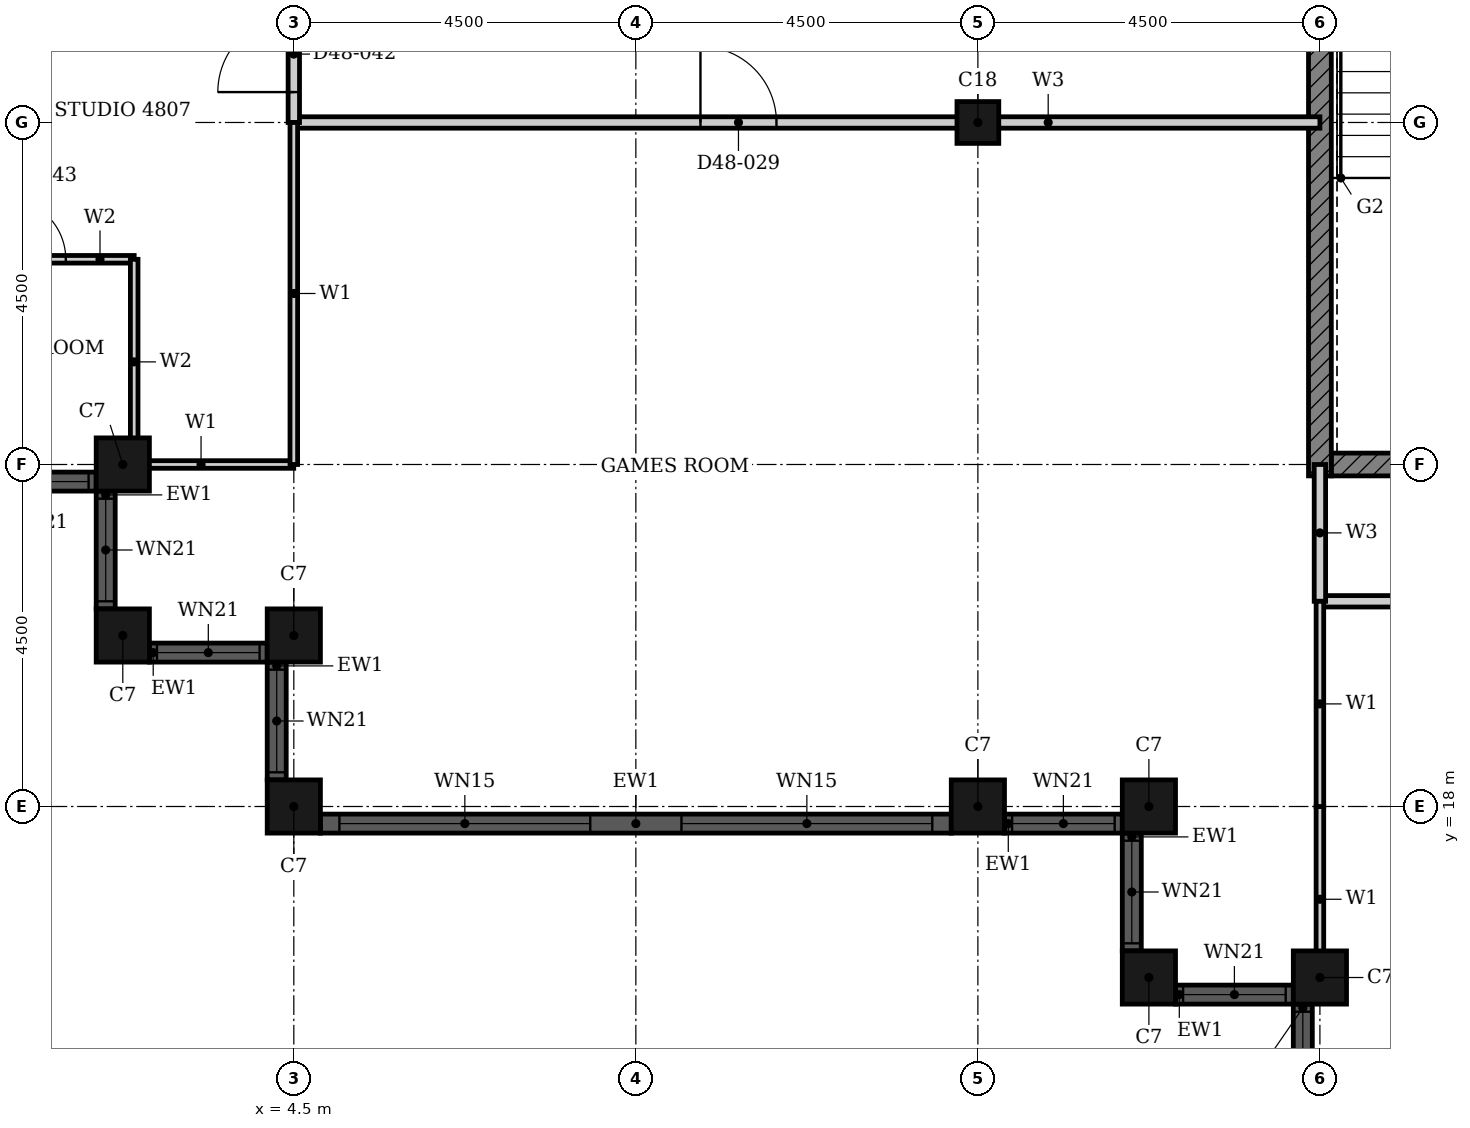
"""IFC4 building model, lengths in metres.
Left out: names, types, materials, properties, quantities, classifications, styles, units other than length and angle.
Written with IfcOpenShell. Run it as: python <this file> out.ifc"""

import sys

from ifc_helpers import new_model, si_unit, direction, frame, frame_2d, origin, origin_2d, place, context, subcontext, project, spatial, rectangle, hollow_rectangle, extrude, element, fill, save


model = new_model("IFC4")
c1 = context("Model", 3, precision=1e-05, world=origin(), true_north=direction((0.0, 1.0)))
c2 = subcontext(c1, "Body", "Model", "MODEL_VIEW")
j1 = project(units=[si_unit("LENGTHUNIT", "METRE"), si_unit("PLANEANGLEUNIT", "RADIAN")], contexts=[c1])
p1 = place(None, origin())
s1 = spatial("IfcSite", under=j1, at=p1, CompositionType="ELEMENT")
p2 = place(p1, origin())
s2 = spatial("IfcBuilding", under=s1, at=p2, CompositionType="ELEMENT")
p3 = place(p2, frame((0.0, 0.0, 192.4)))
s3 = spatial("IfcBuildingStorey", under=s2, at=p3, CompositionType="ELEMENT", Elevation=192.4)
for number, where, z_axis, x_axis in (
    (1, (2.25, 22.5, 0.0), (0.0, 0.0, 1.0), (1.0, 0.0, 0.0)),
    (2, (2.25, 20.25, 0.0), (0.0, 0.0, 1.0), (1.0, 0.0, 0.0)),
    (3, (4.5, 20.25, 0.0), (0.0, 0.0, 1.0), (1.0, 0.0, 0.0)),
    (4, (4.5, 18.0, 0.0), (0.0, 0.0, 1.0), (1.0, 0.0, 0.0)),
    (5, (13.5, 18.0, 0.0), (0.0, 0.0, 1.0), (1.0, 0.0, 0.0)),
    (6, (15.75, 18.0, 0.0), (0.0, 0.0, 1.0), (1.0, 0.0, 0.0)),
    (7, (15.75, 15.75, 0.0), (0.0, 0.0, 1.0), (1.0, 0.0, 0.0)),
    (8, (18.0, 15.75, 0.0), (0.0, 0.0, 1.0), (1.0, 0.0, 0.0)),
):
    element("IfcColumn", number, at=place(p3, frame(where, z_axis=z_axis, x_axis=x_axis)), inside=s3, PredefinedType="COLUMN", context=c2, shape_type="SweptSolid", body=[
        extrude(hollow_rectangle(XDim=0.7, YDim=0.7, WallThickness=0.022, at=origin_2d()), origin(), (0.0, 0.0, 1.0), 3.7),
    ])
p4 = place(p3, frame((13.5, 27.0, 0.0), z_axis=(0.0, 0.0, 1.0), x_axis=(1.0, 0.0, 0.0)))
e9 = element("IfcColumn", 9, at=p4, inside=s3, PredefinedType="COLUMN", context=c2, shape_type="SweptSolid", body=[
    extrude(hollow_rectangle(XDim=0.55, YDim=0.55, WallThickness=0.018, at=origin_2d()), origin(), (0.0, 0.0, 1.0), 3.7),
])
p5 = place(p3, frame((0.35, 22.275, 0.0), z_axis=(0.0, 0.0, 1.0), x_axis=(1.0, 0.0, 0.0)))
e10 = element("IfcWall", 10, at=p5, inside=s3, PredefinedType="SOLIDWALL", context=c2, shape_type="SweptSolid", body=[
    extrude(rectangle(XDim=1.55, YDim=0.25, at=frame_2d((0.775, 0.0))), origin(), (0.0, 0.0, 1.0), 3.7),
])
p6 = place(p5, frame((0.1, 0.0, 0.9)))
e11 = element("IfcOpeningElement", 11, at=p6, cuts=e10, PredefinedType="OPENING", context=c2, shape_type="SweptSolid", body=[
    extrude(rectangle(XDim=1.35, YDim=1.85, at=frame_2d((0.675, 0.925))), frame((0.0, 0.135, 0.0), z_axis=(0.0, -1.0, 0.0), x_axis=(1.0, 0.0, 0.0)), (0.0, 0.0, 1.0), 0.27),
])
p7 = place(p3, frame((2.025, 22.15, 0.0), z_axis=(0.0, 0.0, 1.0), x_axis=(0.0, -1.0, 0.0)))
e12 = element("IfcWall", 12, at=p7, inside=s3, PredefinedType="SOLIDWALL", context=c2, shape_type="SweptSolid", body=[
    extrude(rectangle(XDim=1.55, YDim=0.25, at=frame_2d((0.775, 0.0))), origin(), (0.0, 0.0, 1.0), 3.7),
])
p8 = place(p7, frame((0.1, 0.0, 0.9)))
e13 = element("IfcOpeningElement", 13, at=p8, cuts=e12, PredefinedType="OPENING", context=c2, shape_type="SweptSolid", body=[
    extrude(rectangle(XDim=1.35, YDim=1.85, at=frame_2d((0.675, 0.925))), frame((0.0, 0.135, 0.0), z_axis=(0.0, -1.0, 0.0), x_axis=(1.0, 0.0, 0.0)), (0.0, 0.0, 1.0), 0.27),
])
p9 = place(p3, frame((2.6, 20.025, 0.0), z_axis=(0.0, 0.0, 1.0), x_axis=(1.0, 0.0, 0.0)))
e14 = element("IfcWall", 14, at=p9, inside=s3, PredefinedType="SOLIDWALL", context=c2, shape_type="SweptSolid", body=[
    extrude(rectangle(XDim=1.55, YDim=0.25, at=frame_2d((0.775, 0.0))), origin(), (0.0, 0.0, 1.0), 3.7),
])
p10 = place(p9, frame((0.1, 0.0, 0.9)))
e15 = element("IfcOpeningElement", 15, at=p10, cuts=e14, PredefinedType="OPENING", context=c2, shape_type="SweptSolid", body=[
    extrude(rectangle(XDim=1.35, YDim=1.85, at=frame_2d((0.675, 0.925))), frame((0.0, 0.135, 0.0), z_axis=(0.0, -1.0, 0.0), x_axis=(1.0, 0.0, 0.0)), (0.0, 0.0, 1.0), 0.27),
])
p11 = place(p3, frame((4.275, 19.9, 0.0), z_axis=(0.0, 0.0, 1.0), x_axis=(0.0, -1.0, 0.0)))
e16 = element("IfcWall", 16, at=p11, inside=s3, PredefinedType="SOLIDWALL", context=c2, shape_type="SweptSolid", body=[
    extrude(rectangle(XDim=1.55, YDim=0.25, at=frame_2d((0.775, 0.0))), origin(), (0.0, 0.0, 1.0), 3.7),
])
p12 = place(p11, frame((0.1, 0.0, 0.9)))
e17 = element("IfcOpeningElement", 17, at=p12, cuts=e16, PredefinedType="OPENING", context=c2, shape_type="SweptSolid", body=[
    extrude(rectangle(XDim=1.35, YDim=1.85, at=frame_2d((0.675, 0.925))), frame((0.0, 0.135, 0.0), z_axis=(0.0, -1.0, 0.0), x_axis=(1.0, 0.0, 0.0)), (0.0, 0.0, 1.0), 0.27),
])
p13 = place(p3, frame((4.85, 17.775, 0.0), z_axis=(0.0, 0.0, 1.0), x_axis=(1.0, 0.0, 0.0)))
e18 = element("IfcWall", 18, at=p13, inside=s3, PredefinedType="SOLIDWALL", context=c2, shape_type="SweptSolid", body=[
    extrude(rectangle(XDim=8.3, YDim=0.25, at=frame_2d((4.15, 0.0))), origin(), (0.0, 0.0, 1.0), 3.7),
])
p14 = place(p13, frame((0.25, 0.0, 0.45)))
e19 = element("IfcOpeningElement", 19, at=p14, cuts=e18, PredefinedType="OPENING", context=c2, shape_type="SweptSolid", body=[
    extrude(rectangle(XDim=3.3, YDim=2.3, at=frame_2d((1.65, 1.15))), frame((0.0, 0.135, 0.0), z_axis=(0.0, -1.0, 0.0), x_axis=(1.0, 0.0, 0.0)), (0.0, 0.0, 1.0), 0.27),
])
p15 = place(p13, frame((4.75, 0.0, 0.45)))
e20 = element("IfcOpeningElement", 20, at=p15, cuts=e18, PredefinedType="OPENING", context=c2, shape_type="SweptSolid", body=[
    extrude(rectangle(XDim=3.3, YDim=2.3, at=frame_2d((1.65, 1.15))), frame((0.0, 0.135, 0.0), z_axis=(0.0, -1.0, 0.0), x_axis=(1.0, 0.0, 0.0)), (0.0, 0.0, 1.0), 0.27),
])
p16 = place(p3, frame((13.85, 17.775, 0.0), z_axis=(0.0, 0.0, 1.0), x_axis=(1.0, 0.0, 0.0)))
e21 = element("IfcWall", 21, at=p16, inside=s3, PredefinedType="SOLIDWALL", context=c2, shape_type="SweptSolid", body=[
    extrude(rectangle(XDim=1.55, YDim=0.25, at=frame_2d((0.775, 0.0))), origin(), (0.0, 0.0, 1.0), 3.7),
])
p17 = place(p16, frame((0.1, 0.0, 0.9)))
e22 = element("IfcOpeningElement", 22, at=p17, cuts=e21, PredefinedType="OPENING", context=c2, shape_type="SweptSolid", body=[
    extrude(rectangle(XDim=1.35, YDim=1.85, at=frame_2d((0.675, 0.925))), frame((0.0, 0.135, 0.0), z_axis=(0.0, -1.0, 0.0), x_axis=(1.0, 0.0, 0.0)), (0.0, 0.0, 1.0), 0.27),
])
p18 = place(p3, frame((15.525, 17.65, 0.0), z_axis=(0.0, 0.0, 1.0), x_axis=(0.0, -1.0, 0.0)))
e23 = element("IfcWall", 23, at=p18, inside=s3, PredefinedType="SOLIDWALL", context=c2, shape_type="SweptSolid", body=[
    extrude(rectangle(XDim=1.55, YDim=0.25, at=frame_2d((0.775, 0.0))), origin(), (0.0, 0.0, 1.0), 3.7),
])
p19 = place(p18, frame((0.1, 0.0, 0.9)))
e24 = element("IfcOpeningElement", 24, at=p19, cuts=e23, PredefinedType="OPENING", context=c2, shape_type="SweptSolid", body=[
    extrude(rectangle(XDim=1.35, YDim=1.85, at=frame_2d((0.675, 0.925))), frame((0.0, 0.135, 0.0), z_axis=(0.0, -1.0, 0.0), x_axis=(1.0, 0.0, 0.0)), (0.0, 0.0, 1.0), 0.27),
])
p20 = place(p3, frame((16.1, 15.525, 0.0), z_axis=(0.0, 0.0, 1.0), x_axis=(1.0, 0.0, 0.0)))
e25 = element("IfcWall", 25, at=p20, inside=s3, PredefinedType="SOLIDWALL", context=c2, shape_type="SweptSolid", body=[
    extrude(rectangle(XDim=1.55, YDim=0.25, at=frame_2d((0.775, 0.0))), origin(), (0.0, 0.0, 1.0), 3.7),
])
p21 = place(p20, frame((0.1, 0.0, 0.9)))
e26 = element("IfcOpeningElement", 26, at=p21, cuts=e25, PredefinedType="OPENING", context=c2, shape_type="SweptSolid", body=[
    extrude(rectangle(XDim=1.35, YDim=1.85, at=frame_2d((0.675, 0.925))), frame((0.0, 0.135, 0.0), z_axis=(0.0, -1.0, 0.0), x_axis=(1.0, 0.0, 0.0)), (0.0, 0.0, 1.0), 0.27),
])
p22 = place(p3, frame((17.775, 15.4, 0.0), z_axis=(0.0, 0.0, 1.0), x_axis=(0.0, -1.0, 0.0)))
e27 = element("IfcWall", 27, at=p22, inside=s3, PredefinedType="SOLIDWALL", context=c2, shape_type="SweptSolid", body=[
    extrude(rectangle(XDim=1.55, YDim=0.25, at=frame_2d((0.775, 0.0))), origin(), (0.0, 0.0, 1.0), 3.7),
])
p23 = place(p22, frame((0.1, 0.0, 0.9)))
e28 = element("IfcOpeningElement", 28, at=p23, cuts=e27, PredefinedType="OPENING", context=c2, shape_type="SweptSolid", body=[
    extrude(rectangle(XDim=1.35, YDim=1.85, at=frame_2d((0.675, 0.925))), frame((0.0, 0.135, 0.0), z_axis=(0.0, -1.0, 0.0), x_axis=(1.0, 0.0, 0.0)), (0.0, 0.0, 1.0), 0.27),
])
p24 = place(p3, frame((18.15, 22.5, 0.0), z_axis=(0.0, 0.0, 1.0), x_axis=(1.0, 0.0, 0.0)))
e29 = element("IfcWall", 29, at=p24, inside=s3, PredefinedType="SHEAR", context=c2, shape_type="SweptSolid", body=[
    extrude(rectangle(XDim=4.225, YDim=0.3, at=frame_2d((2.113, 0.0))), origin(), (0.0, 0.0, 1.0), 3.4),
])
p25 = place(p3, frame((18.0, 22.35, 0.0), z_axis=(0.0, 0.0, 1.0), x_axis=(0.0, 1.0, 0.0)))
e30 = element("IfcWall", 30, at=p25, inside=s3, PredefinedType="SHEAR", context=c2, shape_type="SweptSolid", body=[
    extrude(rectangle(XDim=9.3, YDim=0.3, at=frame_2d((4.65, 0.0))), origin(), (0.0, 0.0, 1.0), 3.4),
])
p26 = place(p3, frame((18.0, 20.7, 0.0), z_axis=(0.0, 0.0, 1.0), x_axis=(1.0, 0.0, 0.0)))
e31 = element("IfcWall", 31, at=p26, inside=s3, PredefinedType="PARTITIONING", context=c2, shape_type="SweptSolid", body=[
    extrude(rectangle(XDim=13.5, YDim=0.15, at=frame_2d((6.75, 0.0))), origin(), (0.0, 0.0, 1.0), 3.4),
])
p27 = place(p26, frame((6.25, 0.0, 0.0)))
e32 = element("IfcOpeningElement", 32, at=p27, cuts=e31, PredefinedType="OPENING", context=c2, shape_type="SweptSolid", body=[
    extrude(rectangle(XDim=1.0, YDim=2.1, at=frame_2d((0.5, 1.05))), frame((0.0, 0.085, 0.0), z_axis=(0.0, -1.0, 0.0), x_axis=(1.0, 0.0, 0.0)), (0.0, 0.0, 1.0), 0.17),
])
p28 = place(p3, frame((4.5, 27.0, 0.0), z_axis=(0.0, 0.0, 1.0), x_axis=(1.0, 0.0, 0.0)))
e33 = element("IfcWall", 33, at=p28, inside=s3, PredefinedType="PARTITIONING", context=c2, shape_type="SweptSolid", body=[
    extrude(rectangle(XDim=13.5, YDim=0.15, at=frame_2d((6.75, 0.0))), origin(), (0.0, 0.0, 1.0), 2.68),
])
p29 = place(p28, frame((5.35, 0.0, 0.0)))
e34 = element("IfcOpeningElement", 34, at=p29, cuts=e33, PredefinedType="OPENING", context=c2, shape_type="SweptSolid", body=[
    extrude(rectangle(XDim=1.0, YDim=2.1, at=frame_2d((0.5, 1.05))), frame((0.0, 0.085, 0.0), z_axis=(0.0, -1.0, 0.0), x_axis=(1.0, 0.0, 0.0)), (0.0, 0.0, 1.0), 0.17),
])
p30 = place(p3, frame((18.0, 20.7, 0.0), z_axis=(0.0, 0.0, 1.0), x_axis=(0.0, 1.0, 0.0)))
e35 = element("IfcWall", 35, at=p30, inside=s3, PredefinedType="PARTITIONING", context=c2, shape_type="SweptSolid", body=[
    extrude(rectangle(XDim=1.8, YDim=0.15, at=frame_2d((0.9, 0.0))), origin(), (0.0, 0.0, 1.0), 3.4),
])
p31 = place(p3, frame((4.5, 27.0, 0.0), z_axis=(0.0, 0.0, 1.0), x_axis=(0.0, 1.0, 0.0)))
e36 = element("IfcWall", 36, at=p31, inside=s3, PredefinedType="PARTITIONING", context=c2, shape_type="SweptSolid", body=[
    extrude(rectangle(XDim=1.8, YDim=0.15, at=frame_2d((0.9, 0.0))), origin(), (0.0, 0.0, 1.0), 3.4),
])
p32 = place(p31, frame((0.4, 0.0, 0.0)))
e37 = element("IfcOpeningElement", 37, at=p32, cuts=e36, PredefinedType="OPENING", context=c2, shape_type="SweptSolid", body=[
    extrude(rectangle(XDim=1.0, YDim=2.2, at=frame_2d((0.5, 1.1))), frame((0.0, 0.085, 0.0), z_axis=(0.0, -1.0, 0.0), x_axis=(1.0, 0.0, 0.0)), (0.0, 0.0, 1.0), 0.17),
])
p33 = place(p3, frame((2.06, 22.5, 0.0), z_axis=(0.0, 0.0, 1.0), x_axis=(1.0, 0.0, 0.0)))
e38 = element("IfcWall", 38, at=p33, inside=s3, PredefinedType="PARTITIONING", context=c2, shape_type="SweptSolid", body=[
    extrude(rectangle(XDim=2.439, YDim=0.1, at=frame_2d((1.219, 0.0))), origin(), (0.0, 0.0, 1.0), 2.68),
])
p34 = place(p3, frame((18.0, 15.56, 0.0), z_axis=(0.0, 0.0, 1.0), x_axis=(0.0, 1.0, 0.0)))
e39 = element("IfcWall", 39, at=p34, inside=s3, PredefinedType="PARTITIONING", context=c2, shape_type="SweptSolid", body=[
    extrude(rectangle(XDim=2.439, YDim=0.1, at=frame_2d((1.219, 0.0))), origin(), (0.0, 0.0, 1.0), 3.4),
])
p35 = place(p3, frame((18.0, 18.0, 0.0), z_axis=(0.0, 0.0, 1.0), x_axis=(0.0, 1.0, 0.0)))
e40 = element("IfcWall", 40, at=p35, inside=s3, PredefinedType="PARTITIONING", context=c2, shape_type="SweptSolid", body=[
    extrude(rectangle(XDim=2.7, YDim=0.1, at=frame_2d((1.35, 0.0))), origin(), (0.0, 0.0, 1.0), 3.4),
])
p36 = place(p3, frame((4.5, 22.5, 0.0), z_axis=(0.0, 0.0, 1.0), x_axis=(0.0, 1.0, 0.0)))
e41 = element("IfcWall", 41, at=p36, inside=s3, PredefinedType="PARTITIONING", context=c2, shape_type="SweptSolid", body=[
    extrude(rectangle(XDim=4.5, YDim=0.1, at=frame_2d((2.25, 0.0))), origin(), (0.0, 0.0, 1.0), 3.4),
])
p37 = place(p3, frame((-0.1, 25.2, 0.0), z_axis=(0.0, 0.0, 1.0), x_axis=(1.0, 0.0, 0.0)))
e42 = element("IfcWall", 42, at=p37, inside=s3, PredefinedType="PARTITIONING", context=c2, shape_type="SweptSolid", body=[
    extrude(rectangle(XDim=2.5, YDim=0.1, at=frame_2d((1.25, 0.0))), origin(), (0.0, 0.0, 1.0), 3.4),
])
p38 = place(p37, frame((0.8, 0.0, 0.0)))
e43 = element("IfcOpeningElement", 43, at=p38, cuts=e42, PredefinedType="OPENING", context=c2, shape_type="SweptSolid", body=[
    extrude(rectangle(XDim=0.8, YDim=2.1, at=frame_2d((0.4, 1.05))), frame((0.0, 0.06, 0.0), z_axis=(0.0, -1.0, 0.0), x_axis=(1.0, 0.0, 0.0)), (0.0, 0.0, 1.0), 0.12),
])
p39 = place(p3, frame((2.4, 22.5, 0.0), z_axis=(0.0, 0.0, 1.0), x_axis=(0.0, 1.0, 0.0)))
e44 = element("IfcWall", 44, at=p39, inside=s3, PredefinedType="PARTITIONING", context=c2, shape_type="SweptSolid", body=[
    extrude(rectangle(XDim=2.7, YDim=0.1, at=frame_2d((1.35, 0.0))), origin(), (0.0, 0.0, 1.0), 3.4),
])
p40 = place(p6, origin())
e45 = element("IfcWindow", 45, at=p40, inside=s3, PartitioningType="SINGLE_PANEL", PredefinedType="WINDOW", context=c2, shape_type="SweptSolid", body=[
    extrude(rectangle(XDim=1.35, YDim=1.85, at=frame_2d((0.675, 0.925))), frame((0.0, 0.03, 0.0), z_axis=(0.0, -1.0, 0.0), x_axis=(1.0, 0.0, 0.0)), (0.0, 0.0, 1.0), 0.06),
])
fill(e11, e45)
p41 = place(p8, origin())
e46 = element("IfcWindow", 46, at=p41, inside=s3, PartitioningType="SINGLE_PANEL", PredefinedType="WINDOW", context=c2, shape_type="SweptSolid", body=[
    extrude(rectangle(XDim=1.35, YDim=1.85, at=frame_2d((0.675, 0.925))), frame((0.0, 0.03, 0.0), z_axis=(0.0, -1.0, 0.0), x_axis=(1.0, 0.0, 0.0)), (0.0, 0.0, 1.0), 0.06),
])
fill(e13, e46)
p42 = place(p10, origin())
e47 = element("IfcWindow", 47, at=p42, inside=s3, PartitioningType="SINGLE_PANEL", PredefinedType="WINDOW", context=c2, shape_type="SweptSolid", body=[
    extrude(rectangle(XDim=1.35, YDim=1.85, at=frame_2d((0.675, 0.925))), frame((0.0, 0.03, 0.0), z_axis=(0.0, -1.0, 0.0), x_axis=(1.0, 0.0, 0.0)), (0.0, 0.0, 1.0), 0.06),
])
fill(e15, e47)
p43 = place(p12, origin())
e48 = element("IfcWindow", 48, at=p43, inside=s3, PartitioningType="SINGLE_PANEL", PredefinedType="WINDOW", context=c2, shape_type="SweptSolid", body=[
    extrude(rectangle(XDim=1.35, YDim=1.85, at=frame_2d((0.675, 0.925))), frame((0.0, 0.03, 0.0), z_axis=(0.0, -1.0, 0.0), x_axis=(1.0, 0.0, 0.0)), (0.0, 0.0, 1.0), 0.06),
])
fill(e17, e48)
p44 = place(p14, origin())
e49 = element("IfcWindow", 49, at=p44, inside=s3, PartitioningType="SINGLE_PANEL", PredefinedType="WINDOW", context=c2, shape_type="SweptSolid", body=[
    extrude(rectangle(XDim=3.3, YDim=2.3, at=frame_2d((1.65, 1.15))), frame((0.0, 0.03, 0.0), z_axis=(0.0, -1.0, 0.0), x_axis=(1.0, 0.0, 0.0)), (0.0, 0.0, 1.0), 0.06),
])
fill(e19, e49)
p45 = place(p15, origin())
e50 = element("IfcWindow", 50, at=p45, inside=s3, PartitioningType="SINGLE_PANEL", PredefinedType="WINDOW", context=c2, shape_type="SweptSolid", body=[
    extrude(rectangle(XDim=3.3, YDim=2.3, at=frame_2d((1.65, 1.15))), frame((0.0, 0.03, 0.0), z_axis=(0.0, -1.0, 0.0), x_axis=(1.0, 0.0, 0.0)), (0.0, 0.0, 1.0), 0.06),
])
fill(e20, e50)
p46 = place(p17, origin())
e51 = element("IfcWindow", 51, at=p46, inside=s3, PartitioningType="SINGLE_PANEL", PredefinedType="WINDOW", context=c2, shape_type="SweptSolid", body=[
    extrude(rectangle(XDim=1.35, YDim=1.85, at=frame_2d((0.675, 0.925))), frame((0.0, 0.03, 0.0), z_axis=(0.0, -1.0, 0.0), x_axis=(1.0, 0.0, 0.0)), (0.0, 0.0, 1.0), 0.06),
])
fill(e22, e51)
p47 = place(p19, origin())
e52 = element("IfcWindow", 52, at=p47, inside=s3, PartitioningType="SINGLE_PANEL", PredefinedType="WINDOW", context=c2, shape_type="SweptSolid", body=[
    extrude(rectangle(XDim=1.35, YDim=1.85, at=frame_2d((0.675, 0.925))), frame((0.0, 0.03, 0.0), z_axis=(0.0, -1.0, 0.0), x_axis=(1.0, 0.0, 0.0)), (0.0, 0.0, 1.0), 0.06),
])
fill(e24, e52)
p48 = place(p21, origin())
e53 = element("IfcWindow", 53, at=p48, inside=s3, PartitioningType="SINGLE_PANEL", PredefinedType="WINDOW", context=c2, shape_type="SweptSolid", body=[
    extrude(rectangle(XDim=1.35, YDim=1.85, at=frame_2d((0.675, 0.925))), frame((0.0, 0.03, 0.0), z_axis=(0.0, -1.0, 0.0), x_axis=(1.0, 0.0, 0.0)), (0.0, 0.0, 1.0), 0.06),
])
fill(e26, e53)
p49 = place(p23, origin())
e54 = element("IfcWindow", 54, at=p49, inside=s3, PartitioningType="SINGLE_PANEL", PredefinedType="WINDOW", context=c2, shape_type="SweptSolid", body=[
    extrude(rectangle(XDim=1.35, YDim=1.85, at=frame_2d((0.675, 0.925))), frame((0.0, 0.03, 0.0), z_axis=(0.0, -1.0, 0.0), x_axis=(1.0, 0.0, 0.0)), (0.0, 0.0, 1.0), 0.06),
])
fill(e28, e54)
p50 = place(p29, origin())
e55 = element("IfcDoor", 55, at=p50, inside=s3, OperationType="SINGLE_SWING_LEFT", PredefinedType="DOOR", context=c2, shape_type="SweptSolid", body=[
    extrude(rectangle(XDim=1.0, YDim=2.1, at=frame_2d((0.5, 1.05))), frame((0.0, 0.025, 0.0), z_axis=(0.0, -1.0, 0.0), x_axis=(1.0, 0.0, 0.0)), (0.0, 0.0, 1.0), 0.05),
])
fill(e34, e55)
p51 = place(p32, origin())
e56 = element("IfcDoor", 56, at=p51, inside=s3, OperationType="SINGLE_SWING_LEFT", PredefinedType="DOOR", context=c2, shape_type="SweptSolid", body=[
    extrude(rectangle(XDim=1.0, YDim=2.2, at=frame_2d((0.5, 1.1))), frame((0.0, 0.025, 0.0), z_axis=(0.0, -1.0, 0.0), x_axis=(1.0, 0.0, 0.0)), (0.0, 0.0, 1.0), 0.05),
])
fill(e37, e56)
p52 = place(p38, origin())
e57 = element("IfcDoor", 57, at=p52, inside=s3, OperationType="SINGLE_SWING_LEFT", PredefinedType="DOOR", context=c2, shape_type="SweptSolid", body=[
    extrude(rectangle(XDim=0.8, YDim=2.1, at=frame_2d((0.4, 1.05))), frame((0.0, 0.025, 0.0), z_axis=(0.0, -1.0, 0.0), x_axis=(1.0, 0.0, 0.0)), (0.0, 0.0, 1.0), 0.05),
])
fill(e43, e57)
save(model, sys.argv[1])
